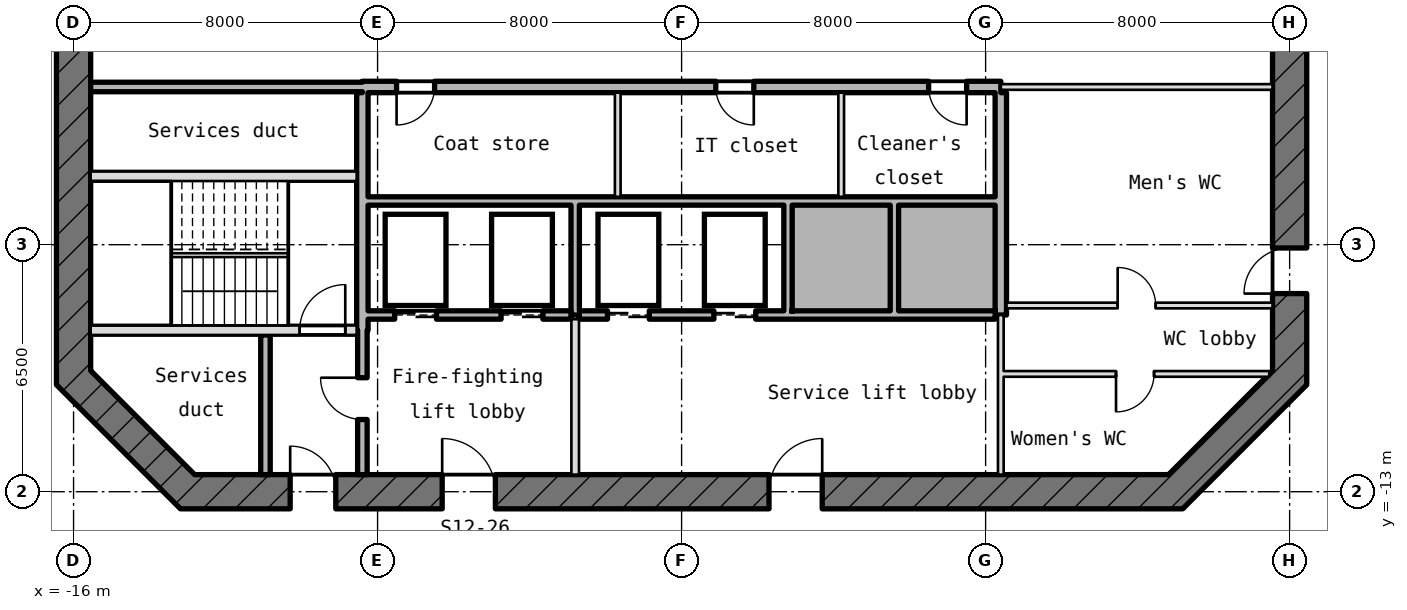
"""IFC4 building model, lengths in metres.
Left out: names, types, materials, properties, quantities, classifications, styles, units other than length and angle.
Written with IfcOpenShell. Run it as: python <this file> out.ifc"""

import sys

from ifc_helpers import new_model, si_unit, direction, frame, frame_2d, origin, place, context, subcontext, project, spatial, rectangle, extrude, element, fill, save


model = new_model("IFC4")
c1 = context("Model", 3, precision=1e-05, world=origin(), true_north=direction((0.0, 1.0)))
c2 = subcontext(c1, "Body", "Model", "MODEL_VIEW")
j1 = project(units=[si_unit("LENGTHUNIT", "METRE"), si_unit("PLANEANGLEUNIT", "RADIAN")], contexts=[c1])
p1 = place(None, origin())
s1 = spatial("IfcSite", under=j1, at=p1, CompositionType="ELEMENT")
p2 = place(p1, origin())
s2 = spatial("IfcBuilding", under=s1, at=p2, CompositionType="ELEMENT")
p3 = place(p2, frame((0.0, 0.0, 185.95)))
s3 = spatial("IfcBuildingStorey", under=s2, at=p3, CompositionType="ELEMENT", Elevation=185.95)
p4 = place(p3, frame((12.868, -13.132, -0.18), z_axis=(0.0, 0.0, 1.0), x_axis=(0.707106781187, 0.707106781187, 0.0)))
e1 = element("IfcWall", 1, at=p4, inside=s3, PredefinedType="SHEAR", context=c2, shape_type="SweptSolid", body=[
    extrude(rectangle(XDim=4.615, YDim=0.9, at=frame_2d((2.308, 0.0))), origin(), (0.0, 0.0, 1.0), 4.15),
])
p5 = place(p3, frame((16.0, -10.186, -0.18), z_axis=(0.0, 0.0, 1.0), x_axis=(0.0, 1.0, 0.0)))
e2 = element("IfcWall", 2, at=p5, inside=s3, PredefinedType="SHEAR", context=c2, shape_type="SweptSolid", body=[
    extrude(rectangle(XDim=20.373, YDim=0.9, at=frame_2d((10.186, 0.0))), origin(), (0.0, 0.0, 1.0), 4.15),
])
p6 = place(p5, frame((8.986, 0.0, 0.18)))
e3 = element("IfcOpeningElement", 3, at=p6, cuts=e2, PredefinedType="OPENING", context=c2, shape_type="SweptSolid", body=[
    extrude(rectangle(XDim=2.4, YDim=2.1, at=frame_2d((1.2, 1.05))), frame((0.0, 0.46, 0.0), z_axis=(0.0, -1.0, 0.0), x_axis=(1.0, 0.0, 0.0)), (0.0, 0.0, 1.0), 0.92),
])
p7 = place(p5, frame((13.586, 0.0, 0.18)))
e4 = element("IfcOpeningElement", 4, at=p7, cuts=e2, PredefinedType="OPENING", context=c2, shape_type="SweptSolid", body=[
    extrude(rectangle(XDim=1.2, YDim=2.1, at=frame_2d((0.6, 1.05))), frame((0.0, 0.46, 0.0), z_axis=(0.0, -1.0, 0.0), x_axis=(1.0, 0.0, 0.0)), (0.0, 0.0, 1.0), 0.92),
])
p8 = place(p5, frame((2.4, 0.0, 0.18)))
e5 = element("IfcOpeningElement", 5, at=p8, cuts=e2, PredefinedType="OPENING", context=c2, shape_type="SweptSolid", body=[
    extrude(rectangle(XDim=1.2, YDim=2.1, at=frame_2d((0.6, 1.05))), frame((0.0, 0.46, 0.0), z_axis=(0.0, -1.0, 0.0), x_axis=(1.0, 0.0, 0.0)), (0.0, 0.0, 1.0), 0.92),
])
p9 = place(p3, frame((-16.0, 10.186, -0.18), z_axis=(0.0, 0.0, 1.0), x_axis=(0.0, -1.0, 0.0)))
e6 = element("IfcWall", 6, at=p9, inside=s3, PredefinedType="SHEAR", context=c2, shape_type="SweptSolid", body=[
    extrude(rectangle(XDim=20.373, YDim=0.9, at=frame_2d((10.186, 0.0))), origin(), (0.0, 0.0, 1.0), 4.15),
])
p10 = place(p9, frame((8.986, 0.0, 0.18)))
e7 = element("IfcOpeningElement", 7, at=p10, cuts=e6, PredefinedType="OPENING", context=c2, shape_type="SweptSolid", body=[
    extrude(rectangle(XDim=2.4, YDim=2.1, at=frame_2d((1.2, 1.05))), frame((0.0, 0.46, 0.0), z_axis=(0.0, -1.0, 0.0), x_axis=(1.0, 0.0, 0.0)), (0.0, 0.0, 1.0), 0.92),
])
p11 = place(p9, frame((5.586, 0.0, 0.18)))
e8 = element("IfcOpeningElement", 8, at=p11, cuts=e6, PredefinedType="OPENING", context=c2, shape_type="SweptSolid", body=[
    extrude(rectangle(XDim=1.2, YDim=2.1, at=frame_2d((0.6, 1.05))), frame((0.0, 0.46, 0.0), z_axis=(0.0, -1.0, 0.0), x_axis=(1.0, 0.0, 0.0)), (0.0, 0.0, 1.0), 0.92),
])
p12 = place(p3, frame((-16.132, -9.868, -0.18), z_axis=(0.0, 0.0, 1.0), x_axis=(0.707106781187, -0.707106781187, 0.0)))
e9 = element("IfcWall", 9, at=p12, inside=s3, PredefinedType="SHEAR", context=c2, shape_type="SweptSolid", body=[
    extrude(rectangle(XDim=4.615, YDim=0.9, at=frame_2d((2.308, 0.0))), origin(), (0.0, 0.0, 1.0), 4.15),
])
p13 = place(p3, frame((-13.186, -13.0, -0.18), z_axis=(0.0, 0.0, 1.0), x_axis=(1.0, 0.0, 0.0)))
e10 = element("IfcWall", 10, at=p13, inside=s3, PredefinedType="SHEAR", context=c2, shape_type="SweptSolid", body=[
    extrude(rectangle(XDim=26.373, YDim=0.9, at=frame_2d((13.186, 0.0))), origin(), (0.0, 0.0, 1.0), 4.15),
])
p14 = place(p13, frame((2.886, 0.0, 0.18)))
e11 = element("IfcOpeningElement", 11, at=p14, cuts=e10, PredefinedType="OPENING", context=c2, shape_type="SweptSolid", body=[
    extrude(rectangle(XDim=1.2, YDim=2.1, at=frame_2d((0.6, 1.05))), frame((0.0, 0.46, 0.0), z_axis=(0.0, -1.0, 0.0), x_axis=(1.0, 0.0, 0.0)), (0.0, 0.0, 1.0), 0.92),
])
p15 = place(p13, frame((6.886, 0.0, 0.18)))
e12 = element("IfcOpeningElement", 12, at=p15, cuts=e10, PredefinedType="OPENING", context=c2, shape_type="SweptSolid", body=[
    extrude(rectangle(XDim=1.4, YDim=2.1, at=frame_2d((0.7, 1.05))), frame((0.0, 0.46, 0.0), z_axis=(0.0, -1.0, 0.0), x_axis=(1.0, 0.0, 0.0)), (0.0, 0.0, 1.0), 0.92),
])
p16 = place(p13, frame((15.486, 0.0, 0.18)))
e13 = element("IfcOpeningElement", 13, at=p16, cuts=e10, PredefinedType="OPENING", context=c2, shape_type="SweptSolid", body=[
    extrude(rectangle(XDim=1.4, YDim=2.1, at=frame_2d((0.7, 1.05))), frame((0.0, 0.46, 0.0), z_axis=(0.0, -1.0, 0.0), x_axis=(1.0, 0.0, 0.0)), (0.0, 0.0, 1.0), 0.92),
])
p17 = place(p3, frame((8.475, -9.9, 0.0), z_axis=(0.0, 0.0, 1.0), x_axis=(1.0, 0.0, 0.0)))
e14 = element("IfcWall", 14, at=p17, inside=s3, PredefinedType="PARTITIONING", context=c2, shape_type="SweptSolid", body=[
    extrude(rectangle(XDim=6.989, YDim=0.15, at=frame_2d((3.494, 0.0))), origin(), (0.0, 0.0, 1.0), 3.97),
])
p18 = place(p17, frame((2.957, 0.0, 0.0)))
e15 = element("IfcOpeningElement", 15, at=p18, cuts=e14, PredefinedType="OPENING", context=c2, shape_type="SweptSolid", body=[
    extrude(rectangle(XDim=1.0, YDim=2.1, at=frame_2d((0.5, 1.05))), frame((0.0, 0.085, 0.0), z_axis=(0.0, -1.0, 0.0), x_axis=(1.0, 0.0, 0.0)), (0.0, 0.0, 1.0), 0.17),
])
p19 = place(p3, frame((-15.55, -8.75, -0.18), z_axis=(0.0, 0.0, 1.0), x_axis=(1.0, 0.0, 0.0)))
e16 = element("IfcWall", 16, at=p19, inside=s3, PredefinedType="SHEAR", context=c2, shape_type="SweptSolid", body=[
    extrude(rectangle(XDim=7.0, YDim=0.25, at=frame_2d((3.5, 0.0))), origin(), (0.0, 0.0, 1.0), 4.15),
])
p20 = place(p19, frame((5.5, 0.0, 0.18)))
e17 = element("IfcOpeningElement", 17, at=p20, cuts=e16, PredefinedType="OPENING", context=c2, shape_type="SweptSolid", body=[
    extrude(rectangle(XDim=1.2, YDim=2.1, at=frame_2d((0.6, 1.05))), frame((0.0, 0.135, 0.0), z_axis=(0.0, -1.0, 0.0), x_axis=(1.0, 0.0, 0.0)), (0.0, 0.0, 1.0), 0.27),
])
p21 = place(p3, frame((-8.25, -8.35, 0.0), z_axis=(0.0, 0.0, 1.0), x_axis=(1.0, 0.0, 0.0)))
e18 = element("IfcWall", 18, at=p21, inside=s3, PredefinedType="STANDARD", context=c2, shape_type="SweptSolid", body=[
    extrude(rectangle(XDim=5.34, YDim=0.22, at=frame_2d((2.67, 0.0))), origin(), (0.0, 0.0, 1.0), 3.97),
])
p22 = place(p21, frame((0.7, 0.0, 0.0)))
e19 = element("IfcOpeningElement", 19, at=p22, cuts=e18, PredefinedType="OPENING", context=c2, shape_type="SweptSolid", body=[
    extrude(rectangle(XDim=1.1, YDim=2.1, at=frame_2d((0.55, 1.05))), frame((0.0, 0.12, 0.0), z_axis=(0.0, -1.0, 0.0), x_axis=(1.0, 0.0, 0.0)), (0.0, 0.0, 1.0), 0.24),
])
p23 = place(p21, frame((3.5, 0.0, 0.0)))
e20 = element("IfcOpeningElement", 20, at=p23, cuts=e18, PredefinedType="OPENING", context=c2, shape_type="SweptSolid", body=[
    extrude(rectangle(XDim=1.1, YDim=2.1, at=frame_2d((0.55, 1.05))), frame((0.0, 0.12, 0.0), z_axis=(0.0, -1.0, 0.0), x_axis=(1.0, 0.0, 0.0)), (0.0, 0.0, 1.0), 0.24),
])
p24 = place(p3, frame((-2.69, -8.35, 0.0), z_axis=(0.0, 0.0, 1.0), x_axis=(1.0, 0.0, 0.0)))
e21 = element("IfcWall", 21, at=p24, inside=s3, PredefinedType="STANDARD", context=c2, shape_type="SweptSolid", body=[
    extrude(rectangle(XDim=10.94, YDim=0.22, at=frame_2d((5.47, 0.0))), origin(), (0.0, 0.0, 1.0), 3.97),
])
p25 = place(p24, frame((0.74, 0.0, 0.0)))
e22 = element("IfcOpeningElement", 22, at=p25, cuts=e21, PredefinedType="OPENING", context=c2, shape_type="SweptSolid", body=[
    extrude(rectangle(XDim=1.1, YDim=2.1, at=frame_2d((0.55, 1.05))), frame((0.0, 0.12, 0.0), z_axis=(0.0, -1.0, 0.0), x_axis=(1.0, 0.0, 0.0)), (0.0, 0.0, 1.0), 0.24),
])
p26 = place(p24, frame((3.54, 0.0, 0.0)))
e23 = element("IfcOpeningElement", 23, at=p26, cuts=e21, PredefinedType="OPENING", context=c2, shape_type="SweptSolid", body=[
    extrude(rectangle(XDim=1.1, YDim=2.1, at=frame_2d((0.55, 1.05))), frame((0.0, 0.12, 0.0), z_axis=(0.0, -1.0, 0.0), x_axis=(1.0, 0.0, 0.0)), (0.0, 0.0, 1.0), 0.24),
])
p27 = place(p3, frame((8.55, -8.1, 0.0), z_axis=(0.0, 0.0, 1.0), x_axis=(1.0, 0.0, 0.0)))
e24 = element("IfcWall", 24, at=p27, inside=s3, PredefinedType="PARTITIONING", context=c2, shape_type="SweptSolid", body=[
    extrude(rectangle(XDim=7.0, YDim=0.15, at=frame_2d((3.5, 0.0))), origin(), (0.0, 0.0, 1.0), 3.97),
])
p28 = place(p27, frame((2.925, 0.0, 0.0)))
e25 = element("IfcOpeningElement", 25, at=p28, cuts=e24, PredefinedType="OPENING", context=c2, shape_type="SweptSolid", body=[
    extrude(rectangle(XDim=1.0, YDim=2.1, at=frame_2d((0.5, 1.05))), frame((0.0, 0.085, 0.0), z_axis=(0.0, -1.0, 0.0), x_axis=(1.0, 0.0, 0.0)), (0.0, 0.0, 1.0), 0.17),
])
p29 = place(p3, frame((-8.25, -5.35, 0.0), z_axis=(0.0, 0.0, 1.0), x_axis=(1.0, 0.0, 0.0)))
e26 = element("IfcWall", 26, at=p29, inside=s3, PredefinedType="STANDARD", context=c2, shape_type="SweptSolid", body=[
    extrude(rectangle(XDim=16.5, YDim=0.22, at=frame_2d((8.25, 0.0))), origin(), (0.0, 0.0, 1.0), 3.97),
])
p30 = place(p3, frame((-15.55, -4.7, -0.18), z_axis=(0.0, 0.0, 1.0), x_axis=(1.0, 0.0, 0.0)))
e27 = element("IfcWall", 27, at=p30, inside=s3, PredefinedType="SHEAR", context=c2, shape_type="SweptSolid", body=[
    extrude(rectangle(XDim=7.0, YDim=0.25, at=frame_2d((3.5, 0.0))), origin(), (0.0, 0.0, 1.0), 4.15),
])
p31 = place(p3, frame((-15.55, -2.35, 0.0), z_axis=(0.0, 0.0, 1.0), x_axis=(1.0, 0.0, 0.0)))
e28 = element("IfcWall", 28, at=p31, inside=s3, PredefinedType="STANDARD", context=c2, shape_type="SweptSolid", body=[
    extrude(rectangle(XDim=7.15, YDim=0.25, at=frame_2d((3.575, 0.0))), origin(), (0.0, 0.0, 1.0), 3.97),
])
p32 = place(p3, frame((-8.4, -2.35, -0.18), z_axis=(0.0, 0.0, 1.0), x_axis=(1.0, 0.0, 0.0)))
e29 = element("IfcWall", 29, at=p32, inside=s3, PredefinedType="SHEAR", context=c2, shape_type="SweptSolid", body=[
    extrude(rectangle(XDim=16.8, YDim=0.3, at=frame_2d((8.4, 0.0))), origin(), (0.0, 0.0, 1.0), 4.15),
])
p33 = place(p32, frame((0.9, 0.0, 0.18)))
e30 = element("IfcOpeningElement", 30, at=p33, cuts=e29, PredefinedType="OPENING", context=c2, shape_type="SweptSolid", body=[
    extrude(rectangle(XDim=1.0, YDim=2.1, at=frame_2d((0.5, 1.05))), frame((0.0, 0.16, 0.0), z_axis=(0.0, -1.0, 0.0), x_axis=(1.0, 0.0, 0.0)), (0.0, 0.0, 1.0), 0.32),
])
p34 = place(p32, frame((9.3, 0.0, 0.18)))
e31 = element("IfcOpeningElement", 31, at=p34, cuts=e29, PredefinedType="OPENING", context=c2, shape_type="SweptSolid", body=[
    extrude(rectangle(XDim=1.0, YDim=2.1, at=frame_2d((0.5, 1.05))), frame((0.0, 0.16, 0.0), z_axis=(0.0, -1.0, 0.0), x_axis=(1.0, 0.0, 0.0)), (0.0, 0.0, 1.0), 0.32),
])
p35 = place(p32, frame((14.9, 0.0, 0.18)))
e32 = element("IfcOpeningElement", 32, at=p35, cuts=e29, PredefinedType="OPENING", context=c2, shape_type="SweptSolid", body=[
    extrude(rectangle(XDim=1.0, YDim=2.1, at=frame_2d((0.5, 1.05))), frame((0.0, 0.16, 0.0), z_axis=(0.0, -1.0, 0.0), x_axis=(1.0, 0.0, 0.0)), (0.0, 0.0, 1.0), 0.32),
])
p36 = place(p3, frame((8.4, -2.35, 0.0), z_axis=(0.0, 0.0, 1.0), x_axis=(1.0, 0.0, 0.0)))
e33 = element("IfcWall", 33, at=p36, inside=s3, PredefinedType="PARTITIONING", context=c2, shape_type="SweptSolid", body=[
    extrude(rectangle(XDim=7.15, YDim=0.15, at=frame_2d((3.575, 0.0))), origin(), (0.0, 0.0, 1.0), 3.97),
])
p37 = place(p3, frame((-10.95, -12.55, 0.0), z_axis=(0.0, 0.0, 1.0), x_axis=(0.0, 1.0, 0.0)))
e34 = element("IfcWall", 34, at=p37, inside=s3, PredefinedType="STANDARD", context=c2, shape_type="SweptSolid", body=[
    extrude(rectangle(XDim=3.675, YDim=0.25, at=frame_2d((1.837, 0.0))), origin(), (0.0, 0.0, 1.0), 3.97),
])
p38 = place(p3, frame((-8.4, -12.55, 0.0), z_axis=(0.0, 0.0, 1.0), x_axis=(0.0, 1.0, 0.0)))
e35 = element("IfcWall", 35, at=p38, inside=s3, PredefinedType="STANDARD", context=c2, shape_type="SweptSolid", body=[
    extrude(rectangle(XDim=3.8, YDim=0.25, at=frame_2d((1.9, 0.0))), origin(), (0.0, 0.0, 1.0), 3.97),
])
p39 = place(p38, frame((1.45, 0.0, 0.0)))
e36 = element("IfcOpeningElement", 36, at=p39, cuts=e35, PredefinedType="OPENING", context=c2, shape_type="SweptSolid", body=[
    extrude(rectangle(XDim=1.1, YDim=2.1, at=frame_2d((0.55, 1.05))), frame((0.0, 0.135, 0.0), z_axis=(0.0, -1.0, 0.0), x_axis=(1.0, 0.0, 0.0)), (0.0, 0.0, 1.0), 0.27),
])
p40 = place(p3, frame((-8.4, -8.75, -0.18), z_axis=(0.0, 0.0, 1.0), x_axis=(0.0, 1.0, 0.0)))
e37 = element("IfcWall", 37, at=p40, inside=s3, PredefinedType="SHEAR", context=c2, shape_type="SweptSolid", body=[
    extrude(rectangle(XDim=6.25, YDim=0.3, at=frame_2d((3.125, 0.0))), origin(), (0.0, 0.0, 1.0), 4.15),
])
p41 = place(p3, frame((-2.8, -12.55, 0.0), z_axis=(0.0, 0.0, 1.0), x_axis=(0.0, 1.0, 0.0)))
e38 = element("IfcWall", 38, at=p41, inside=s3, PredefinedType="PARTITIONING", context=c2, shape_type="SweptSolid", body=[
    extrude(rectangle(XDim=4.09, YDim=0.2, at=frame_2d((2.045, 0.0))), origin(), (0.0, 0.0, 1.0), 3.97),
])
p42 = place(p3, frame((-2.8, -8.35, 0.0), z_axis=(0.0, 0.0, 1.0), x_axis=(0.0, 1.0, 0.0)))
e39 = element("IfcWall", 39, at=p42, inside=s3, PredefinedType="STANDARD", context=c2, shape_type="SweptSolid", body=[
    extrude(rectangle(XDim=2.89, YDim=0.22, at=frame_2d((1.445, 0.0))), origin(), (0.0, 0.0, 1.0), 3.97),
])
p43 = place(p3, frame((-1.68, -5.24, 0.0), z_axis=(0.0, 0.0, 1.0), x_axis=(0.0, 1.0, 0.0)))
e40 = element("IfcWall", 40, at=p43, inside=s3, PredefinedType="PARTITIONING", context=c2, shape_type="SweptSolid", body=[
    extrude(rectangle(XDim=2.74, YDim=0.15, at=frame_2d((1.37, 0.0))), origin(), (0.0, 0.0, 1.0), 3.97),
])
p44 = place(p3, frame((2.8, -8.24, 0.0), z_axis=(0.0, 0.0, 1.0), x_axis=(0.0, 1.0, 0.0)))
e41 = element("IfcWall", 41, at=p44, inside=s3, PredefinedType="STANDARD", context=c2, shape_type="SweptSolid", body=[
    extrude(rectangle(XDim=2.78, YDim=0.22, at=frame_2d((1.39, 0.0))), origin(), (0.0, 0.0, 1.0), 3.97),
])
p45 = place(p3, frame((4.2, -5.24, 0.0), z_axis=(0.0, 0.0, 1.0), x_axis=(0.0, 1.0, 0.0)))
e42 = element("IfcWall", 42, at=p45, inside=s3, PredefinedType="PARTITIONING", context=c2, shape_type="SweptSolid", body=[
    extrude(rectangle(XDim=2.74, YDim=0.15, at=frame_2d((1.37, 0.0))), origin(), (0.0, 0.0, 1.0), 3.97),
])
p46 = place(p3, frame((5.6, -8.24, 0.0), z_axis=(0.0, 0.0, 1.0), x_axis=(0.0, 1.0, 0.0)))
e43 = element("IfcWall", 43, at=p46, inside=s3, PredefinedType="STANDARD", context=c2, shape_type="SweptSolid", body=[
    extrude(rectangle(XDim=2.78, YDim=0.22, at=frame_2d((1.39, 0.0))), origin(), (0.0, 0.0, 1.0), 3.97),
])
p47 = place(p3, frame((8.4, -12.55, 0.0), z_axis=(0.0, 0.0, 1.0), x_axis=(0.0, 1.0, 0.0)))
e44 = element("IfcWall", 44, at=p47, inside=s3, PredefinedType="PARTITIONING", context=c2, shape_type="SweptSolid", body=[
    extrude(rectangle(XDim=4.2, YDim=0.15, at=frame_2d((2.1, 0.0))), origin(), (0.0, 0.0, 1.0), 3.97),
])
p48 = place(p3, frame((8.4, -8.35, -0.18), z_axis=(0.0, 0.0, 1.0), x_axis=(0.0, 1.0, 0.0)))
e45 = element("IfcWall", 45, at=p48, inside=s3, PredefinedType="SHEAR", context=c2, shape_type="SweptSolid", body=[
    extrude(rectangle(XDim=5.85, YDim=0.3, at=frame_2d((2.925, 0.0))), origin(), (0.0, 0.0, 1.0), 4.15),
])
p49 = place(p22, origin())
e46 = element("IfcDoor", 46, at=p49, inside=s3, OperationType="DOUBLE_DOOR_SLIDING", PredefinedType="DOOR", context=c2, shape_type="SweptSolid", body=[
    extrude(rectangle(XDim=1.1, YDim=2.1, at=frame_2d((0.55, 1.05))), frame((0.0, 0.025, 0.0), z_axis=(0.0, -1.0, 0.0), x_axis=(1.0, 0.0, 0.0)), (0.0, 0.0, 1.0), 0.05),
])
fill(e19, e46)
p50 = place(p23, origin())
e47 = element("IfcDoor", 47, at=p50, inside=s3, OperationType="DOUBLE_DOOR_SLIDING", PredefinedType="DOOR", context=c2, shape_type="SweptSolid", body=[
    extrude(rectangle(XDim=1.1, YDim=2.1, at=frame_2d((0.55, 1.05))), frame((0.0, 0.025, 0.0), z_axis=(0.0, -1.0, 0.0), x_axis=(1.0, 0.0, 0.0)), (0.0, 0.0, 1.0), 0.05),
])
fill(e20, e47)
p51 = place(p25, origin())
e48 = element("IfcDoor", 48, at=p51, inside=s3, OperationType="DOUBLE_DOOR_SLIDING", PredefinedType="DOOR", context=c2, shape_type="SweptSolid", body=[
    extrude(rectangle(XDim=1.1, YDim=2.1, at=frame_2d((0.55, 1.05))), frame((0.0, 0.025, 0.0), z_axis=(0.0, -1.0, 0.0), x_axis=(1.0, 0.0, 0.0)), (0.0, 0.0, 1.0), 0.05),
])
fill(e22, e48)
p52 = place(p26, origin())
e49 = element("IfcDoor", 49, at=p52, inside=s3, OperationType="DOUBLE_DOOR_SLIDING", PredefinedType="DOOR", context=c2, shape_type="SweptSolid", body=[
    extrude(rectangle(XDim=1.1, YDim=2.1, at=frame_2d((0.55, 1.05))), frame((0.0, 0.025, 0.0), z_axis=(0.0, -1.0, 0.0), x_axis=(1.0, 0.0, 0.0)), (0.0, 0.0, 1.0), 0.05),
])
fill(e23, e49)
p53 = place(p20, origin())
e50 = element("IfcDoor", 50, at=p53, inside=s3, OperationType="SINGLE_SWING_RIGHT", PredefinedType="DOOR", context=c2, shape_type="SweptSolid", body=[
    extrude(rectangle(XDim=1.2, YDim=2.1, at=frame_2d((0.6, 1.05))), frame((0.0, 0.025, 0.0), z_axis=(0.0, -1.0, 0.0), x_axis=(1.0, 0.0, 0.0)), (0.0, 0.0, 1.0), 0.05),
])
fill(e17, e50)
p54 = place(p39, origin())
e51 = element("IfcDoor", 51, at=p54, inside=s3, OperationType="SINGLE_SWING_RIGHT", PredefinedType="DOOR", context=c2, shape_type="SweptSolid", body=[
    extrude(rectangle(XDim=1.1, YDim=2.1, at=frame_2d((0.55, 1.05))), frame((0.0, 0.025, 0.0), z_axis=(0.0, -1.0, 0.0), x_axis=(1.0, 0.0, 0.0)), (0.0, 0.0, 1.0), 0.05),
])
fill(e36, e51)
p55 = place(p14, origin())
e52 = element("IfcDoor", 52, at=p55, inside=s3, OperationType="SINGLE_SWING_RIGHT", PredefinedType="DOOR", context=c2, shape_type="SweptSolid", body=[
    extrude(rectangle(XDim=1.2, YDim=2.1, at=frame_2d((0.6, 1.05))), frame((0.0, 0.025, 0.0), z_axis=(0.0, -1.0, 0.0), x_axis=(1.0, 0.0, 0.0)), (0.0, 0.0, 1.0), 0.05),
])
fill(e11, e52)
p56 = place(p15, origin())
e53 = element("IfcDoor", 53, at=p56, inside=s3, OperationType="SINGLE_SWING_RIGHT", PredefinedType="DOOR", context=c2, shape_type="SweptSolid", body=[
    extrude(rectangle(XDim=1.4, YDim=2.1, at=frame_2d((0.7, 1.05))), frame((0.0, 0.025, 0.0), z_axis=(0.0, -1.0, 0.0), x_axis=(1.0, 0.0, 0.0)), (0.0, 0.0, 1.0), 0.05),
])
fill(e12, e53)
p57 = place(p16, origin())
e54 = element("IfcDoor", 54, at=p57, inside=s3, OperationType="SINGLE_SWING_RIGHT", PredefinedType="DOOR", context=c2, shape_type="SweptSolid", body=[
    extrude(rectangle(XDim=1.4, YDim=2.1, at=frame_2d((0.7, 1.05))), frame((0.0, 0.025, 0.0), z_axis=(0.0, -1.0, 0.0), x_axis=(1.0, 0.0, 0.0)), (0.0, 0.0, 1.0), 0.05),
])
fill(e13, e54)
p58 = place(p33, frame((1.0, 0.0, 0.0), z_axis=(0.0, 0.0, 1.0), x_axis=(-1.0, 0.0, 0.0)))
e55 = element("IfcDoor", 55, at=p58, inside=s3, OperationType="SINGLE_SWING_LEFT", PredefinedType="DOOR", context=c2, shape_type="SweptSolid", body=[
    extrude(rectangle(XDim=1.0, YDim=2.1, at=frame_2d((0.5, 1.05))), frame((0.0, 0.025, 0.0), z_axis=(0.0, -1.0, 0.0), x_axis=(1.0, 0.0, 0.0)), (0.0, 0.0, 1.0), 0.05),
])
fill(e30, e55)
p59 = place(p34, frame((1.0, 0.0, 0.0), z_axis=(0.0, 0.0, 1.0), x_axis=(-1.0, 0.0, 0.0)))
e56 = element("IfcDoor", 56, at=p59, inside=s3, OperationType="SINGLE_SWING_LEFT", PredefinedType="DOOR", context=c2, shape_type="SweptSolid", body=[
    extrude(rectangle(XDim=1.0, YDim=2.1, at=frame_2d((0.5, 1.05))), frame((0.0, 0.025, 0.0), z_axis=(0.0, -1.0, 0.0), x_axis=(1.0, 0.0, 0.0)), (0.0, 0.0, 1.0), 0.05),
])
fill(e31, e56)
p60 = place(p35, frame((1.0, 0.0, 0.0), z_axis=(0.0, 0.0, 1.0), x_axis=(-1.0, 0.0, 0.0)))
e57 = element("IfcDoor", 57, at=p60, inside=s3, OperationType="SINGLE_SWING_LEFT", PredefinedType="DOOR", context=c2, shape_type="SweptSolid", body=[
    extrude(rectangle(XDim=1.0, YDim=2.1, at=frame_2d((0.5, 1.05))), frame((0.0, 0.025, 0.0), z_axis=(0.0, -1.0, 0.0), x_axis=(1.0, 0.0, 0.0)), (0.0, 0.0, 1.0), 0.05),
])
fill(e32, e57)
p61 = place(p28, origin())
e58 = element("IfcDoor", 58, at=p61, inside=s3, OperationType="SINGLE_SWING_RIGHT", PredefinedType="DOOR", context=c2, shape_type="SweptSolid", body=[
    extrude(rectangle(XDim=1.0, YDim=2.1, at=frame_2d((0.5, 1.05))), frame((0.0, 0.025, 0.0), z_axis=(0.0, -1.0, 0.0), x_axis=(1.0, 0.0, 0.0)), (0.0, 0.0, 1.0), 0.05),
])
fill(e25, e58)
p62 = place(p8, origin())
e59 = element("IfcDoor", 59, at=p62, inside=s3, OperationType="SINGLE_SWING_RIGHT", PredefinedType="DOOR", context=c2, shape_type="SweptSolid", body=[
    extrude(rectangle(XDim=1.2, YDim=2.1, at=frame_2d((0.6, 1.05))), frame((0.0, 0.025, 0.0), z_axis=(0.0, -1.0, 0.0), x_axis=(1.0, 0.0, 0.0)), (0.0, 0.0, 1.0), 0.05),
])
fill(e5, e59)
p63 = place(p18, frame((1.0, 0.0, 0.0), z_axis=(0.0, 0.0, 1.0), x_axis=(-1.0, 0.0, 0.0)))
e60 = element("IfcDoor", 60, at=p63, inside=s3, OperationType="SINGLE_SWING_LEFT", PredefinedType="DOOR", context=c2, shape_type="SweptSolid", body=[
    extrude(rectangle(XDim=1.0, YDim=2.1, at=frame_2d((0.5, 1.05))), frame((0.0, 0.025, 0.0), z_axis=(0.0, -1.0, 0.0), x_axis=(1.0, 0.0, 0.0)), (0.0, 0.0, 1.0), 0.05),
])
fill(e15, e60)
save(model, sys.argv[1])
